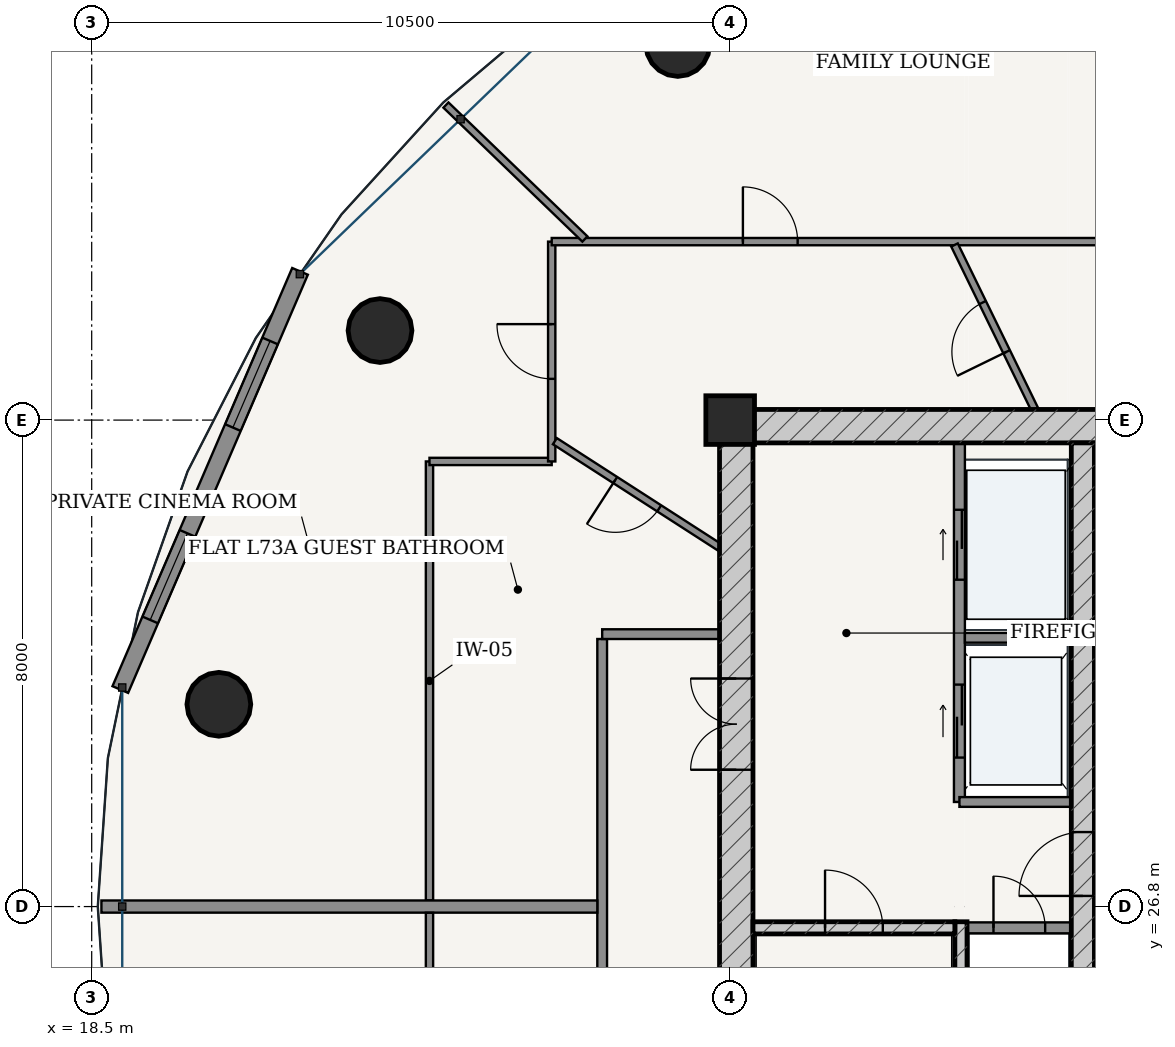
"""IFC4 building model, lengths in metres.
Left out: names, types, materials, properties, quantities, classifications, styles, units other than length and angle.
Written with IfcOpenShell. Run it as: python <this file> out.ifc"""

import sys

from ifc_helpers import new_model, si_unit, direction, frame, frame_2d, origin, origin_2d, place, context, subcontext, project, spatial, rectangle, hollow_circle, extrude, source, transform, mapped, element, fill, save


model = new_model("IFC4")
c1 = context("Model", 3, precision=1e-05, world=origin(), true_north=direction((-0.2419218956, 0.970295726276)))
c2 = subcontext(c1, "Body", "Model", "MODEL_VIEW")
j1 = project(units=[si_unit("LENGTHUNIT", "METRE"), si_unit("PLANEANGLEUNIT", "RADIAN")], contexts=[c1])
p1 = place(None, origin())
s1 = spatial("IfcSite", under=j1, at=p1, CompositionType="ELEMENT")
p2 = place(p1, origin())
s2 = spatial("IfcBuilding", under=s1, at=p2, CompositionType="ELEMENT")
p3 = place(p2, frame((0.0, 0.0, 278.2)))
s3 = spatial("IfcBuildingStorey", under=s2, at=p3, CompositionType="ELEMENT", Elevation=278.2)
p4 = place(p3, frame((29.0, 34.8, 0.0), z_axis=(0.0, 0.0, 1.0), x_axis=(1.0, 0.0, 0.0)))
e1 = element("IfcColumn", 1, at=p4, inside=s3, PredefinedType="COLUMN", context=c2, shape_type="SweptSolid", body=[
    extrude(rectangle(XDim=0.8, YDim=0.8, at=origin_2d()), origin(), (0.0, 0.0, 1.0), 3.75),
])
p5 = place(p3, frame((28.825, 34.7, 0.0), z_axis=(0.0, 0.0, 1.0), x_axis=(1.0, 0.0, 0.0)))
e2 = element("IfcWall", 2, at=p5, inside=s3, PredefinedType="SHEAR", context=c2, shape_type="SweptSolid", body=[
    extrude(rectangle(XDim=18.35, YDim=0.55, at=frame_2d((9.175, 0.0))), origin(), (0.0, 0.0, 1.0), 3.49),
])
p6 = place(p3, frame((29.1, 19.175, 0.0), z_axis=(0.0, 0.0, 1.0), x_axis=(0.0, 1.0, 0.0)))
e3 = element("IfcWall", 3, at=p6, inside=s3, PredefinedType="SHEAR", context=c2, shape_type="SweptSolid", body=[
    extrude(rectangle(XDim=15.25, YDim=0.55, at=frame_2d((7.625, 0.0))), origin(), (0.0, 0.0, 1.0), 3.49),
])
p7 = place(p6, frame((9.875, 0.0, 0.0)))
e4 = element("IfcOpeningElement", 4, at=p7, cuts=e3, PredefinedType="OPENING", context=c2, shape_type="SweptSolid", body=[
    extrude(rectangle(XDim=1.5, YDim=2.2, at=frame_2d((0.75, 1.1))), frame((0.0, 0.285, 0.0), z_axis=(0.0, -1.0, 0.0), x_axis=(1.0, 0.0, 0.0)), (0.0, 0.0, 1.0), 0.57),
])
p8 = place(p3, frame((32.795, 19.175, 0.0), z_axis=(0.0, 0.0, 1.0), x_axis=(0.0, 1.0, 0.0)))
e5 = element("IfcWall", 5, at=p8, inside=s3, PredefinedType="SOLIDWALL", context=c2, shape_type="SweptSolid", body=[
    extrude(rectangle(XDim=7.375, YDim=0.2, at=frame_2d((3.688, 0.0))), origin(), (0.0, 0.0, 1.0), 3.49),
])
p9 = place(p3, frame((29.375, 26.45, 0.0), z_axis=(0.0, 0.0, 1.0), x_axis=(1.0, 0.0, 0.0)))
e6 = element("IfcWall", 6, at=p9, inside=s3, PredefinedType="SOLIDWALL", context=c2, shape_type="SweptSolid", body=[
    extrude(rectangle(XDim=3.32, YDim=0.2, at=frame_2d((1.66, 0.0))), origin(), (0.0, 0.0, 1.0), 3.49),
])
p10 = place(p9, frame((1.185, 0.0, 0.0)))
e7 = element("IfcOpeningElement", 7, at=p10, cuts=e6, PredefinedType="OPENING", context=c2, shape_type="SweptSolid", body=[
    extrude(rectangle(XDim=0.95, YDim=2.15, at=frame_2d((0.475, 1.075))), frame((0.0, 0.11, 0.0), z_axis=(0.0, -1.0, 0.0), x_axis=(1.0, 0.0, 0.0)), (0.0, 0.0, 1.0), 0.22),
])
p11 = place(p3, frame((34.8, 19.175, 0.0), z_axis=(0.0, 0.0, 1.0), x_axis=(0.0, 1.0, 0.0)))
e8 = element("IfcWall", 8, at=p11, inside=s3, PredefinedType="SHEAR", context=c2, shape_type="SweptSolid", body=[
    extrude(rectangle(XDim=15.25, YDim=0.38, at=frame_2d((7.625, 0.0))), origin(), (0.0, 0.0, 1.0), 3.49),
])
p12 = place(p11, frame((7.8, 0.0, 0.0)))
e9 = element("IfcOpeningElement", 9, at=p12, cuts=e8, PredefinedType="OPENING", context=c2, shape_type="SweptSolid", body=[
    extrude(rectangle(XDim=1.05, YDim=2.15, at=frame_2d((0.525, 1.075))), frame((0.0, 0.2, 0.0), z_axis=(0.0, -1.0, 0.0), x_axis=(1.0, 0.0, 0.0)), (0.0, 0.0, 1.0), 0.4),
])
for number, where, z_axis, x_axis in (
    (10, (28.139, 40.977, 0.0), (0.0, 0.0, 1.0), (1.0, 0.0, 0.0)),
    (11, (23.241, 36.272, 0.0), (0.0, 0.0, 1.0), (1.0, 0.0, 0.0)),
    (12, (20.591, 30.126, 0.0), (0.0, 0.0, 1.0), (1.0, 0.0, 0.0)),
):
    element("IfcColumn", number, at=place(p3, frame(where, z_axis=z_axis, x_axis=x_axis)), inside=s3, PredefinedType="COLUMN", context=c2, shape_type="SweptSolid", body=[
        extrude(hollow_circle(Radius=0.525, WallThickness=0.035, at=origin_2d()), origin(), (0.0, 0.0, 1.0), 3.75),
    ])
p13 = place(p3, frame((21.926, 37.246, 0.0), z_axis=(0.0, 0.0, 1.0), x_axis=(-0.394816612978, -0.918759948037, 0.0)))
e13 = element("IfcWall", 13, at=p13, inside=s3, PredefinedType="SOLIDWALL", context=c2, shape_type="SweptSolid", body=[
    extrude(rectangle(XDim=7.485, YDim=0.28, at=frame_2d((3.743, 0.0))), origin(), (0.0, 0.0, 1.0), 3.49),
])
p14 = place(p13, frame((1.246, 0.0, 0.85)))
e14 = element("IfcOpeningElement", 14, at=p14, cuts=e13, PredefinedType="OPENING", context=c2, shape_type="SweptSolid", body=[
    extrude(rectangle(XDim=1.55, YDim=1.95, at=frame_2d((0.775, 0.975))), frame((0.0, 0.15, 0.0), z_axis=(0.0, -1.0, 0.0), x_axis=(1.0, 0.0, 0.0)), (0.0, 0.0, 1.0), 0.3),
])
p15 = place(p13, frame((4.689, 0.0, 0.85)))
e15 = element("IfcOpeningElement", 15, at=p15, cuts=e13, PredefinedType="OPENING", context=c2, shape_type="SweptSolid", body=[
    extrude(rectangle(XDim=1.55, YDim=1.95, at=frame_2d((0.775, 0.975))), frame((0.0, 0.15, 0.0), z_axis=(0.0, -1.0, 0.0), x_axis=(1.0, 0.0, 0.0)), (0.0, 0.0, 1.0), 0.3),
])
p16 = place(p3, frame((32.9, 26.45, 0.0), z_axis=(0.0, 0.0, 1.0), x_axis=(1.0, 0.0, 0.0)))
e16 = element("IfcWall", 16, at=p16, inside=s3, PredefinedType="PARTITIONING", context=c2, shape_type="SweptSolid", body=[
    extrude(rectangle(XDim=1.71, YDim=0.18, at=frame_2d((0.855, 0.0))), origin(), (0.0, 0.0, 1.0), 3.49),
])
p17 = place(p16, frame((0.43, 0.0, 0.0)))
e17 = element("IfcOpeningElement", 17, at=p17, cuts=e16, PredefinedType="OPENING", context=c2, shape_type="SweptSolid", body=[
    extrude(rectangle(XDim=0.85, YDim=2.1, at=frame_2d((0.425, 1.05))), frame((0.0, 0.1, 0.0), z_axis=(0.0, -1.0, 0.0), x_axis=(1.0, 0.0, 0.0)), (0.0, 0.0, 1.0), 0.2),
])
p18 = place(p3, frame((32.77, 28.52, 0.0), z_axis=(0.0, 0.0, 1.0), x_axis=(0.0, 1.0, 0.0)))
e18 = element("IfcWall", 18, at=p18, inside=s3, PredefinedType="PARTITIONING", context=c2, shape_type="SweptSolid", body=[
    extrude(rectangle(XDim=5.905, YDim=0.18, at=frame_2d((2.953, 0.0))), origin(), (0.0, 0.0, 1.0), 3.49),
])
p19 = place(p18, frame((3.655, 0.0, 0.0)))
e19 = element("IfcOpeningElement", 19, at=p19, cuts=e18, PredefinedType="OPENING", context=c2, shape_type="SweptSolid", body=[
    extrude(rectangle(XDim=1.15, YDim=2.2, at=frame_2d((0.575, 1.1))), frame((0.0, 0.1, 0.0), z_axis=(0.0, -1.0, 0.0), x_axis=(1.0, 0.0, 0.0)), (0.0, 0.0, 1.0), 0.2),
])
p20 = place(p18, frame((0.73, 0.0, 0.0)))
e20 = element("IfcOpeningElement", 20, at=p20, cuts=e18, PredefinedType="OPENING", context=c2, shape_type="SweptSolid", body=[
    extrude(rectangle(XDim=1.2, YDim=2.25, at=frame_2d((0.6, 1.125))), frame((0.0, 0.1, 0.0), z_axis=(0.0, -1.0, 0.0), x_axis=(1.0, 0.0, 0.0)), (0.0, 0.0, 1.0), 0.2),
])
p21 = place(p3, frame((32.86, 31.22, 0.0), z_axis=(0.0, 0.0, 1.0), x_axis=(1.0, 0.0, 0.0)))
e21 = element("IfcWall", 21, at=p21, inside=s3, PredefinedType="PARTITIONING", context=c2, shape_type="SweptSolid", body=[
    extrude(rectangle(XDim=1.75, YDim=0.16, at=frame_2d((0.875, 0.0))), origin(), (0.0, 0.0, 1.0), 3.49),
])
p22 = place(p3, frame((32.77, 28.52, 0.0), z_axis=(0.0, 0.0, 1.0), x_axis=(1.0, 0.0, 0.0)))
e22 = element("IfcWall", 22, at=p22, inside=s3, PredefinedType="PARTITIONING", context=c2, shape_type="SweptSolid", body=[
    extrude(rectangle(XDim=1.84, YDim=0.16, at=frame_2d((0.92, 0.0))), origin(), (0.0, 0.0, 1.0), 3.49),
])
p23 = place(p3, frame((34.99, 28.56, 0.0), z_axis=(0.0, 0.0, 1.0), x_axis=(1.0, 0.0, 0.0)))
e23 = element("IfcWall", 23, at=p23, inside=s3, PredefinedType="PARTITIONING", context=c2, shape_type="SweptSolid", body=[
    extrude(rectangle(XDim=6.02, YDim=0.16, at=frame_2d((3.01, 0.0))), origin(), (0.0, 0.0, 1.0), 3.49),
])
p24 = place(p23, frame((1.025, 0.0, 0.0)))
e24 = element("IfcOpeningElement", 24, at=p24, cuts=e23, PredefinedType="OPENING", context=c2, shape_type="SweptSolid", body=[
    extrude(rectangle(XDim=0.86, YDim=2.1, at=frame_2d((0.43, 1.05))), frame((0.0, 0.09, 0.0), z_axis=(0.0, -1.0, 0.0), x_axis=(1.0, 0.0, 0.0)), (0.0, 0.0, 1.0), 0.18),
])
p25 = place(p23, frame((4.14, 0.0, 0.0)))
e25 = element("IfcOpeningElement", 25, at=p25, cuts=e23, PredefinedType="OPENING", context=c2, shape_type="SweptSolid", body=[
    extrude(rectangle(XDim=0.85, YDim=2.1, at=frame_2d((0.425, 1.05))), frame((0.0, 0.09, 0.0), z_axis=(0.0, -1.0, 0.0), x_axis=(1.0, 0.0, 0.0)), (0.0, 0.0, 1.0), 0.18),
])
p26 = place(p3, frame((34.99, 26.28, 0.0), z_axis=(0.0, 0.0, 1.0), x_axis=(1.0, 0.0, 0.0)))
e26 = element("IfcWall", 26, at=p26, inside=s3, PredefinedType="PARTITIONING", context=c2, shape_type="SweptSolid", body=[
    extrude(rectangle(XDim=6.02, YDim=0.16, at=frame_2d((3.01, 0.0))), origin(), (0.0, 0.0, 1.0), 3.49),
])
p27 = place(p26, frame((1.045, 0.0, 0.0)))
e27 = element("IfcOpeningElement", 27, at=p27, cuts=e26, PredefinedType="OPENING", context=c2, shape_type="SweptSolid", body=[
    extrude(rectangle(XDim=0.85, YDim=2.1, at=frame_2d((0.425, 1.05))), frame((0.0, 0.09, 0.0), z_axis=(0.0, -1.0, 0.0), x_axis=(1.0, 0.0, 0.0)), (0.0, 0.0, 1.0), 0.18),
])
p28 = place(p26, frame((3.215, 0.0, 0.0)))
e28 = element("IfcOpeningElement", 28, at=p28, cuts=e26, PredefinedType="OPENING", context=c2, shape_type="SweptSolid", body=[
    extrude(rectangle(XDim=1.1, YDim=2.2, at=frame_2d((0.55, 1.1))), frame((0.0, 0.09, 0.0), z_axis=(0.0, -1.0, 0.0), x_axis=(1.0, 0.0, 0.0)), (0.0, 0.0, 1.0), 0.18),
])
p29 = place(p26, frame((4.695, 0.0, 0.0)))
e29 = element("IfcOpeningElement", 29, at=p29, cuts=e26, PredefinedType="OPENING", context=c2, shape_type="SweptSolid", body=[
    extrude(rectangle(XDim=1.1, YDim=2.2, at=frame_2d((0.55, 1.1))), frame((0.0, 0.09, 0.0), z_axis=(0.0, -1.0, 0.0), x_axis=(1.0, 0.0, 0.0)), (0.0, 0.0, 1.0), 0.18),
])
p30 = place(p3, frame((26.895, 17.275, 0.0), z_axis=(0.0, 0.0, 1.0), x_axis=(0.0, 1.0, 0.0)))
e30 = element("IfcWall", 30, at=p30, inside=s3, PredefinedType="PARTITIONING", context=c2, shape_type="SweptSolid", body=[
    extrude(rectangle(XDim=13.925, YDim=0.16, at=frame_2d((6.962, 0.0))), origin(), (0.0, 0.0, 1.0), 3.015),
])
p31 = place(p30, frame((2.735, 0.0, 0.0)))
e31 = element("IfcOpeningElement", 31, at=p31, cuts=e30, PredefinedType="OPENING", context=c2, shape_type="SweptSolid", body=[
    extrude(rectangle(XDim=0.98, YDim=2.2, at=frame_2d((0.49, 1.1))), frame((0.0, 0.09, 0.0), z_axis=(0.0, -1.0, 0.0), x_axis=(1.0, 0.0, 0.0)), (0.0, 0.0, 1.0), 0.18),
])
p32 = place(p3, frame((26.895, 31.28, 0.0), z_axis=(0.0, 0.0, 1.0), x_axis=(1.0, 0.0, 0.0)))
e32 = element("IfcWall", 32, at=p32, inside=s3, PredefinedType="PARTITIONING", context=c2, shape_type="SweptSolid", body=[
    extrude(rectangle(XDim=1.93, YDim=0.16, at=frame_2d((0.965, 0.0))), origin(), (0.0, 0.0, 1.0), 3.49),
])
p33 = place(p3, frame((24.055, 26.902, 0.0), z_axis=(0.0, 0.0, 1.0), x_axis=(0.0, 1.0, 0.0)))
e33 = element("IfcWall", 33, at=p33, inside=s3, PredefinedType="PARTITIONING", context=c2, shape_type="SweptSolid", body=[
    extrude(rectangle(XDim=7.218, YDim=0.12, at=frame_2d((3.609, 0.0))), origin(), (0.0, 0.0, 1.0), 3.015),
])
p34 = place(p3, frame((24.055, 34.12, 0.0), z_axis=(0.0, 0.0, 1.0), x_axis=(1.0, 0.0, 0.0)))
e34 = element("IfcWall", 34, at=p34, inside=s3, PredefinedType="PARTITIONING", context=c2, shape_type="SweptSolid", body=[
    extrude(rectangle(XDim=2.01, YDim=0.12, at=frame_2d((1.005, 0.0))), origin(), (0.0, 0.0, 1.0), 3.209),
])
p35 = place(p3, frame((26.065, 34.12, 0.0), z_axis=(0.0, 0.0, 1.0), x_axis=(0.0, 1.0, 0.0)))
e35 = element("IfcWall", 35, at=p35, inside=s3, PredefinedType="PARTITIONING", context=c2, shape_type="SweptSolid", body=[
    extrude(rectangle(XDim=3.615, YDim=0.12, at=frame_2d((1.808, 0.0))), origin(), (0.0, 0.0, 1.0), 3.015),
])
p36 = place(p35, frame((1.358, 0.0, 0.0)))
e36 = element("IfcOpeningElement", 36, at=p36, cuts=e35, PredefinedType="OPENING", context=c2, shape_type="SweptSolid", body=[
    extrude(rectangle(XDim=0.9, YDim=2.15, at=frame_2d((0.45, 1.075))), frame((0.0, 0.07, 0.0), z_axis=(0.0, -1.0, 0.0), x_axis=(1.0, 0.0, 0.0)), (0.0, 0.0, 1.0), 0.14),
])
p37 = place(p3, frame((26.065, 37.735, 0.0), z_axis=(0.0, 0.0, 1.0), x_axis=(1.0, 0.0, 0.0)))
e37 = element("IfcWall", 37, at=p37, inside=s3, PredefinedType="PARTITIONING", context=c2, shape_type="SweptSolid", body=[
    extrude(rectangle(XDim=23.87, YDim=0.12, at=frame_2d((11.935, 0.0))), origin(), (0.0, 0.0, 1.0), 3.015),
])
p38 = place(p37, frame((18.46, 0.0, 0.0)))
e38 = element("IfcOpeningElement", 38, at=p38, cuts=e37, PredefinedType="OPENING", context=c2, shape_type="SweptSolid", body=[
    extrude(rectangle(XDim=0.9, YDim=2.15, at=frame_2d((0.45, 1.075))), frame((0.0, 0.07, 0.0), z_axis=(0.0, -1.0, 0.0), x_axis=(1.0, 0.0, 0.0)), (0.0, 0.0, 1.0), 0.14),
])
p39 = place(p37, frame((3.144, 0.0, 0.0)))
e39 = element("IfcOpeningElement", 39, at=p39, cuts=e37, PredefinedType="OPENING", context=c2, shape_type="SweptSolid", body=[
    extrude(rectangle(XDim=0.9, YDim=2.15, at=frame_2d((0.45, 1.075))), frame((0.0, 0.07, 0.0), z_axis=(0.0, -1.0, 0.0), x_axis=(1.0, 0.0, 0.0)), (0.0, 0.0, 1.0), 0.14),
])
p40 = place(p3, frame((35.731, 37.796, 0.0), z_axis=(0.0, 0.0, 1.0), x_axis=(-0.202101574245, 0.979364566281, 0.0)))
e40 = element("IfcWall", 40, at=p40, inside=s3, PredefinedType="PARTITIONING", context=c2, shape_type="SweptSolid", body=[
    extrude(rectangle(XDim=7.4, YDim=0.12, at=frame_2d((3.7, 0.0))), origin(), (0.0, 0.0, 1.0), 3.015),
])
p41 = place(p3, frame((26.611, 37.778, 0.0), z_axis=(0.0, 0.0, 1.0), x_axis=(-0.719985652574, 0.693988948102, 0.0)))
e41 = element("IfcWall", 41, at=p41, inside=s3, PredefinedType="PARTITIONING", context=c2, shape_type="SweptSolid", body=[
    extrude(rectangle(XDim=3.174, YDim=0.12, at=frame_2d((1.587, 0.0))), origin(), (0.0, 0.0, 1.0), 3.121),
])
p42 = place(p3, frame((34.008, 34.977, 0.0), z_axis=(0.0, 0.0, 1.0), x_axis=(-0.438717914863, 0.898624833386, 0.0)))
e42 = element("IfcWall", 42, at=p42, inside=s3, PredefinedType="PARTITIONING", context=c2, shape_type="SweptSolid", body=[
    extrude(rectangle(XDim=3.007, YDim=0.12, at=frame_2d((1.504, 0.0))), origin(), (0.0, 0.0, 1.0), 3.49),
])
p43 = place(p42, frame((1.054, 0.0, 0.0)))
e43 = element("IfcOpeningElement", 43, at=p43, cuts=e42, PredefinedType="OPENING", context=c2, shape_type="SweptSolid", body=[
    extrude(rectangle(XDim=0.9, YDim=2.15, at=frame_2d((0.45, 1.075))), frame((0.0, 0.07, 0.0), z_axis=(0.0, -1.0, 0.0), x_axis=(1.0, 0.0, 0.0)), (0.0, 0.0, 1.0), 0.14),
])
p44 = place(p3, frame((28.825, 32.709, 0.0), z_axis=(0.0, 0.0, 1.0), x_axis=(-0.840692964871, 0.541512085568, 0.0)))
e44 = element("IfcWall", 44, at=p44, inside=s3, PredefinedType="PARTITIONING", context=c2, shape_type="SweptSolid", body=[
    extrude(rectangle(XDim=3.221, YDim=0.12, at=frame_2d((1.61, 0.0))), origin(), (0.0, 0.0, 1.0), 3.015),
])
p45 = place(p44, frame((1.18, 0.0, 0.0)))
e45 = element("IfcOpeningElement", 45, at=p45, cuts=e44, PredefinedType="OPENING", context=c2, shape_type="SweptSolid", body=[
    extrude(rectangle(XDim=0.86, YDim=2.15, at=frame_2d((0.43, 1.075))), frame((0.0, 0.07, 0.0), z_axis=(0.0, -1.0, 0.0), x_axis=(1.0, 0.0, 0.0)), (0.0, 0.0, 1.0), 0.14),
])
p46 = place(p3, frame((26.815, 26.8, 0.0), z_axis=(0.0, 0.0, 1.0), x_axis=(-1.0, 0.0, 0.0)))
e46 = element("IfcWall", 46, at=p46, inside=s3, PredefinedType="PARTITIONING", context=c2, shape_type="SweptSolid", body=[
    extrude(rectangle(XDim=8.155, YDim=0.2, at=frame_2d((4.078, 0.0))), origin(), (0.0, 0.0, 1.0), 3.121),
])
p47 = place(p3, frame((24.055, 14.355, 0.0), z_axis=(0.0, 0.0, 1.0), x_axis=(0.0, 1.0, 0.0)))
e47 = element("IfcWall", 47, at=p47, inside=s3, PredefinedType="PARTITIONING", context=c2, shape_type="SweptSolid", body=[
    extrude(rectangle(XDim=12.343, YDim=0.12, at=frame_2d((6.171, 0.0))), origin(), (0.0, 0.0, 1.0), 3.015),
])
p48 = place(p47, frame((5.442, 0.0, 0.0)))
e48 = element("IfcOpeningElement", 48, at=p48, cuts=e47, PredefinedType="OPENING", context=c2, shape_type="SweptSolid", body=[
    extrude(rectangle(XDim=0.9, YDim=2.15, at=frame_2d((0.45, 1.075))), frame((0.0, 0.07, 0.0), z_axis=(0.0, -1.0, 0.0), x_axis=(1.0, 0.0, 0.0)), (0.0, 0.0, 1.0), 0.14),
])
m1 = source(origin(), c2, "Body", "SweptSolid", [
    extrude(rectangle(XDim=1.55, YDim=1.95, at=frame_2d((0.775, 0.975))), frame((0.0, 0.03, 0.0), z_axis=(0.0, -1.0, 0.0), x_axis=(1.0, 0.0, 0.0)), (0.0, 0.0, 1.0), 0.06),
])
p49 = place(p14, origin())
e49 = element("IfcWindow", 49, at=p49, inside=s3, PartitioningType="SINGLE_PANEL", PredefinedType="WINDOW", context=c2, shape_type="MappedRepresentation", body=[
    mapped(m1, transform((0.0, 0.0, 0.0), scale=1.0)),
])
fill(e14, e49)
p50 = place(p15, origin())
e50 = element("IfcWindow", 50, at=p50, inside=s3, PartitioningType="SINGLE_PANEL", PredefinedType="WINDOW", context=c2, shape_type="MappedRepresentation", body=[
    mapped(m1, transform((0.0, 0.0, 0.0), scale=1.0)),
])
fill(e15, e50)
m2 = source(origin(), c2, "Body", "SweptSolid", [
    extrude(rectangle(XDim=1.5, YDim=2.2, at=frame_2d((0.75, 1.1))), frame((0.0, 0.025, 0.0), z_axis=(0.0, -1.0, 0.0), x_axis=(1.0, 0.0, 0.0)), (0.0, 0.0, 1.0), 0.05),
])
p51 = place(p7, origin())
e51 = element("IfcDoor", 51, at=p51, inside=s3, OperationType="DOUBLE_DOOR_SINGLE_SWING", PredefinedType="DOOR", context=c2, shape_type="MappedRepresentation", body=[
    mapped(m2, transform((0.0, 0.0, 0.0), scale=1.0)),
])
fill(e4, e51)
m3 = source(origin(), c2, "Body", "SweptSolid", [
    extrude(rectangle(XDim=1.05, YDim=2.15, at=frame_2d((0.525, 1.075))), frame((0.0, 0.025, 0.0), z_axis=(0.0, -1.0, 0.0), x_axis=(1.0, 0.0, 0.0)), (0.0, 0.0, 1.0), 0.05),
])
p52 = place(p12, origin())
e52 = element("IfcDoor", 52, at=p52, inside=s3, OperationType="SINGLE_SWING_LEFT", PredefinedType="DOOR", context=c2, shape_type="MappedRepresentation", body=[
    mapped(m3, transform((0.0, 0.0, 0.0), scale=1.0)),
])
fill(e9, e52)
m4 = source(origin(), c2, "Body", "SweptSolid", [
    extrude(rectangle(XDim=0.95, YDim=2.15, at=frame_2d((0.475, 1.075))), frame((0.0, 0.025, 0.0), z_axis=(0.0, -1.0, 0.0), x_axis=(1.0, 0.0, 0.0)), (0.0, 0.0, 1.0), 0.05),
])
p53 = place(p10, origin())
e53 = element("IfcDoor", 53, at=p53, inside=s3, OperationType="SINGLE_SWING_LEFT", PredefinedType="DOOR", context=c2, shape_type="MappedRepresentation", body=[
    mapped(m4, transform((0.0, 0.0, 0.0), scale=1.0)),
])
fill(e7, e53)
m5 = source(origin(), c2, "Body", "SweptSolid", [
    extrude(rectangle(XDim=0.85, YDim=2.1, at=frame_2d((0.425, 1.05))), frame((0.0, 0.025, 0.0), z_axis=(0.0, -1.0, 0.0), x_axis=(1.0, 0.0, 0.0)), (0.0, 0.0, 1.0), 0.05),
])
p54 = place(p17, origin())
e54 = element("IfcDoor", 54, at=p54, inside=s3, OperationType="SINGLE_SWING_LEFT", PredefinedType="DOOR", context=c2, shape_type="MappedRepresentation", body=[
    mapped(m5, transform((0.0, 0.0, 0.0), scale=1.0)),
])
fill(e17, e54)
m6 = source(origin(), c2, "Body", "SweptSolid", [
    extrude(rectangle(XDim=1.15, YDim=2.2, at=frame_2d((0.575, 1.1))), frame((0.0, 0.025, 0.0), z_axis=(0.0, -1.0, 0.0), x_axis=(1.0, 0.0, 0.0)), (0.0, 0.0, 1.0), 0.05),
])
p55 = place(p19, origin())
e55 = element("IfcDoor", 55, at=p55, inside=s3, OperationType="DOUBLE_DOOR_SLIDING", PredefinedType="DOOR", context=c2, shape_type="MappedRepresentation", body=[
    mapped(m6, transform((0.0, 0.0, 0.0), scale=1.0)),
])
fill(e19, e55)
m7 = source(origin(), c2, "Body", "SweptSolid", [
    extrude(rectangle(XDim=1.2, YDim=2.25, at=frame_2d((0.6, 1.125))), frame((0.0, 0.025, 0.0), z_axis=(0.0, -1.0, 0.0), x_axis=(1.0, 0.0, 0.0)), (0.0, 0.0, 1.0), 0.05),
])
p56 = place(p20, origin())
e56 = element("IfcDoor", 56, at=p56, inside=s3, OperationType="DOUBLE_DOOR_SLIDING", PredefinedType="DOOR", context=c2, shape_type="MappedRepresentation", body=[
    mapped(m7, transform((0.0, 0.0, 0.0), scale=1.0)),
])
fill(e20, e56)
m8 = source(origin(), c2, "Body", "SweptSolid", [
    extrude(rectangle(XDim=0.9, YDim=2.15, at=frame_2d((0.45, 1.075))), frame((0.0, 0.025, 0.0), z_axis=(0.0, -1.0, 0.0), x_axis=(1.0, 0.0, 0.0)), (0.0, 0.0, 1.0), 0.05),
])
p57 = place(p43, origin())
e57 = element("IfcDoor", 57, at=p57, inside=s3, OperationType="SINGLE_SWING_LEFT", PredefinedType="DOOR", context=c2, shape_type="MappedRepresentation", body=[
    mapped(m8, transform((0.0, 0.0, 0.0), scale=1.0)),
])
fill(e43, e57)
m9 = source(origin(), c2, "Body", "SweptSolid", [
    extrude(rectangle(XDim=0.86, YDim=2.15, at=frame_2d((0.43, 1.075))), frame((0.0, 0.025, 0.0), z_axis=(0.0, -1.0, 0.0), x_axis=(1.0, 0.0, 0.0)), (0.0, 0.0, 1.0), 0.05),
])
p58 = place(p45, origin())
e58 = element("IfcDoor", 58, at=p58, inside=s3, OperationType="SINGLE_SWING_RIGHT", PredefinedType="DOOR", context=c2, shape_type="MappedRepresentation", body=[
    mapped(m9, transform((0.0, 0.0, 0.0), scale=1.0)),
])
fill(e45, e58)
p59 = place(p39, origin())
e59 = element("IfcDoor", 59, at=p59, inside=s3, OperationType="SINGLE_SWING_LEFT", PredefinedType="DOOR", context=c2, shape_type="MappedRepresentation", body=[
    mapped(m8, transform((0.0, 0.0, 0.0), scale=1.0)),
])
fill(e39, e59)
p60 = place(p36, origin())
e60 = element("IfcDoor", 60, at=p60, inside=s3, OperationType="SINGLE_SWING_RIGHT", PredefinedType="DOOR", context=c2, shape_type="MappedRepresentation", body=[
    mapped(m8, transform((0.0, 0.0, 0.0), scale=1.0)),
])
fill(e36, e60)
save(model, sys.argv[1])
